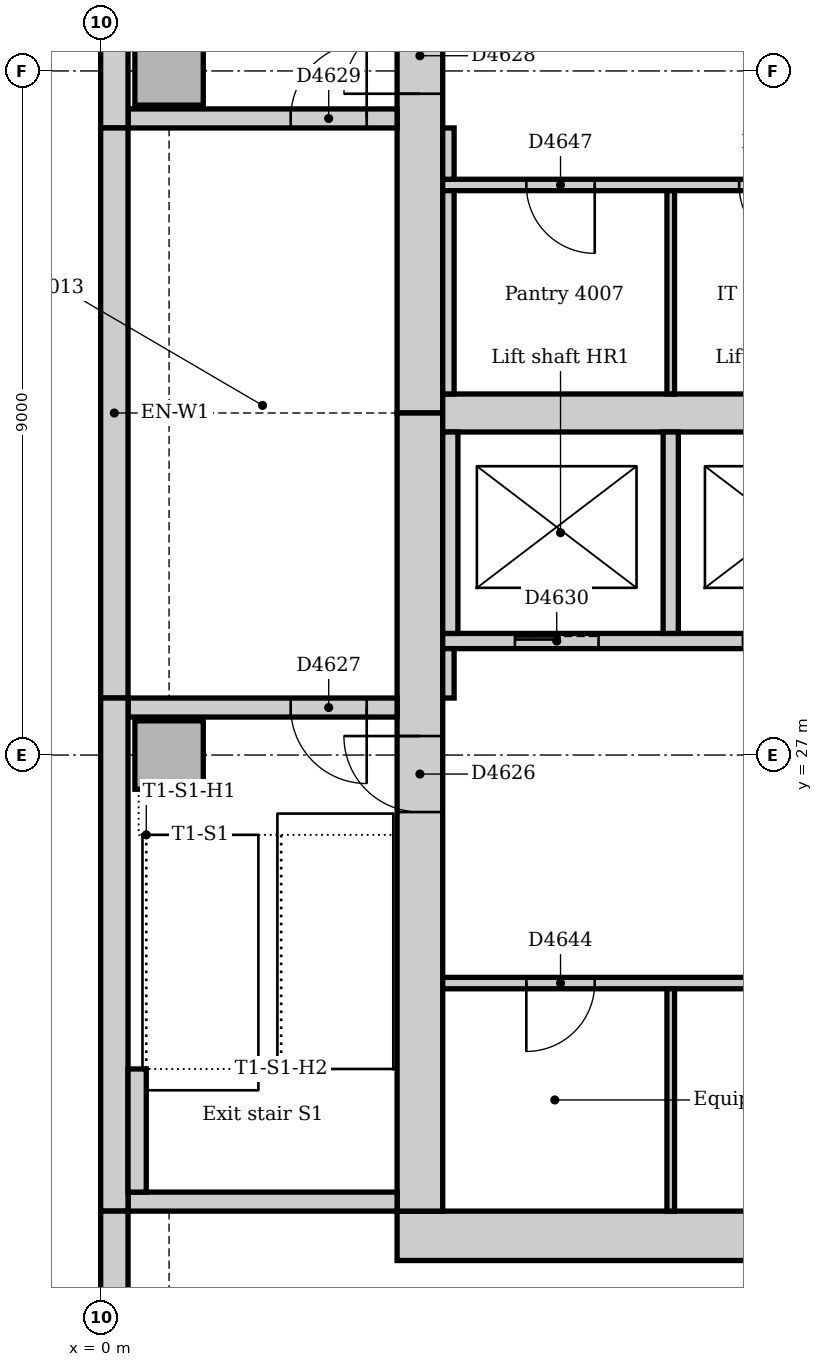
"""IFC4 building model, lengths in metres.
Left out: names, types, materials, properties, quantities, classifications, styles, units other than length and angle.
Written with IfcOpenShell. Run it as: python <this file> out.ifc"""

import sys

from ifc_helpers import new_model, si_unit, direction, frame, frame_2d, origin, origin_2d, place, context, subcontext, project, spatial, rectangle, extrude, element, fill, save


model = new_model("IFC4")
c1 = context("Model", 3, precision=1e-05, world=origin(), true_north=direction((0.0, 1.0)))
c2 = subcontext(c1, "Body", "Model", "MODEL_VIEW")
j1 = project(units=[si_unit("LENGTHUNIT", "METRE"), si_unit("PLANEANGLEUNIT", "RADIAN")], contexts=[c1])
p1 = place(None, origin())
s1 = spatial("IfcSite", under=j1, at=p1, CompositionType="ELEMENT")
p2 = place(p1, origin())
s2 = spatial("IfcBuilding", under=s1, at=p2, CompositionType="ELEMENT")
p3 = place(p2, frame((0.0, 0.0, 169.0)))
s3 = spatial("IfcBuildingStorey", under=s2, at=p3, CompositionType="ELEMENT", Elevation=169.0)
p4 = place(p3, frame((3.9, 20.675, 0.0), z_axis=(0.0, 0.0, 1.0), x_axis=(1.0, 0.0, 0.0)))
e1 = element("IfcWall", 1, at=p4, inside=s3, PredefinedType="SOLIDWALL", context=c2, shape_type="SweptSolid", body=[
    extrude(rectangle(XDim=19.25, YDim=0.65, at=frame_2d((9.625, 0.0))), origin(), (0.0, 0.0, 1.0), 4.0),
])
p5 = place(p3, frame((4.2, 42.0, 0.0), z_axis=(0.0, 0.0, 1.0), x_axis=(0.0, -1.0, 0.0)))
e2 = element("IfcWall", 2, at=p5, inside=s3, PredefinedType="SOLIDWALL", context=c2, shape_type="SweptSolid", body=[
    extrude(rectangle(XDim=10.5, YDim=0.6, at=frame_2d((5.25, 0.0))), origin(), (0.0, 0.0, 1.0), 4.0),
])
p6 = place(p5, frame((5.3, 0.0, 0.0)))
e3 = element("IfcOpeningElement", 3, at=p6, cuts=e2, PredefinedType="OPENING", context=c2, shape_type="SweptSolid", body=[
    extrude(rectangle(XDim=1.0, YDim=2.1, at=frame_2d((0.5, 1.05))), frame((0.0, 0.31, 0.0), z_axis=(0.0, -1.0, 0.0), x_axis=(1.0, 0.0, 0.0)), (0.0, 0.0, 1.0), 0.62),
])
p7 = place(p3, frame((4.2, 31.5, 0.0), z_axis=(0.0, 0.0, 1.0), x_axis=(0.0, -1.0, 0.0)))
e4 = element("IfcWall", 4, at=p7, inside=s3, PredefinedType="SOLIDWALL", context=c2, shape_type="SweptSolid", body=[
    extrude(rectangle(XDim=10.5, YDim=0.6, at=frame_2d((5.25, 0.0))), origin(), (0.0, 0.0, 1.0), 4.0),
])
p8 = place(p7, frame((4.25, 0.0, 0.0)))
e5 = element("IfcOpeningElement", 5, at=p8, cuts=e4, PredefinedType="OPENING", context=c2, shape_type="SweptSolid", body=[
    extrude(rectangle(XDim=1.0, YDim=2.1, at=frame_2d((0.5, 1.05))), frame((0.0, 0.31, 0.0), z_axis=(0.0, -1.0, 0.0), x_axis=(1.0, 0.0, 0.0)), (0.0, 0.0, 1.0), 0.62),
])
p9 = place(p3, frame((4.5, 31.5, 0.0), z_axis=(0.0, 0.0, 1.0), x_axis=(1.0, 0.0, 0.0)))
e6 = element("IfcWall", 6, at=p9, inside=s3, PredefinedType="SOLIDWALL", context=c2, shape_type="SweptSolid", body=[
    extrude(rectangle(XDim=18.0, YDim=0.5, at=frame_2d((9.0, 0.0))), origin(), (0.0, 0.0, 1.0), 4.0),
])
p10 = place(p3, frame((0.36, 21.125, 0.0), z_axis=(0.0, 0.0, 1.0), x_axis=(1.0, 0.0, 0.0)))
e7 = element("IfcWall", 7, at=p10, inside=s3, PredefinedType="SOLIDWALL", context=c2, shape_type="SweptSolid", body=[
    extrude(rectangle(XDim=3.54, YDim=0.25, at=frame_2d((1.77, 0.0))), origin(), (0.0, 0.0, 1.0), 4.0),
])
p11 = place(p3, frame((3.9, 27.625, 0.0), z_axis=(0.0, 0.0, 1.0), x_axis=(-1.0, 0.0, 0.0)))
e8 = element("IfcWall", 8, at=p11, inside=s3, PredefinedType="SOLIDWALL", context=c2, shape_type="SweptSolid", body=[
    extrude(rectangle(XDim=3.54, YDim=0.25, at=frame_2d((1.77, 0.0))), origin(), (0.0, 0.0, 1.0), 4.0),
])
p12 = place(p11, frame((0.4, 0.0, 0.0)))
e9 = element("IfcOpeningElement", 9, at=p12, cuts=e8, PredefinedType="OPENING", context=c2, shape_type="SweptSolid", body=[
    extrude(rectangle(XDim=1.0, YDim=2.1, at=frame_2d((0.5, 1.05))), frame((0.0, 0.135, 0.0), z_axis=(0.0, -1.0, 0.0), x_axis=(1.0, 0.0, 0.0)), (0.0, 0.0, 1.0), 0.27),
])
p13 = place(p3, frame((0.36, 35.375, 0.0), z_axis=(0.0, 0.0, 1.0), x_axis=(1.0, 0.0, 0.0)))
e10 = element("IfcWall", 10, at=p13, inside=s3, PredefinedType="SOLIDWALL", context=c2, shape_type="SweptSolid", body=[
    extrude(rectangle(XDim=3.54, YDim=0.25, at=frame_2d((1.77, 0.0))), origin(), (0.0, 0.0, 1.0), 4.0),
])
p14 = place(p13, frame((2.14, 0.0, 0.0)))
e11 = element("IfcOpeningElement", 11, at=p14, cuts=e10, PredefinedType="OPENING", context=c2, shape_type="SweptSolid", body=[
    extrude(rectangle(XDim=1.0, YDim=2.1, at=frame_2d((0.5, 1.05))), frame((0.0, 0.135, 0.0), z_axis=(0.0, -1.0, 0.0), x_axis=(1.0, 0.0, 0.0)), (0.0, 0.0, 1.0), 0.27),
])
for number, where, z_axis, x_axis in (
    (12, (0.9, 27.0, 0.0), (0.0, 0.0, 1.0), (1.0, 0.0, 0.0)),
    (13, (0.9, 36.0, 0.0), (0.0, 0.0, 1.0), (1.0, 0.0, 0.0)),
):
    element("IfcColumn", number, at=place(p3, frame(where, z_axis=z_axis, x_axis=x_axis)), inside=s3, PredefinedType="COLUMN", context=c2, shape_type="SweptSolid", body=[
        extrude(rectangle(XDim=0.9, YDim=0.9, at=origin_2d()), origin(), (0.0, 0.0, 1.0), 4.0),
    ])
p15 = place(p3, frame((0.18, 42.0, 0.0), z_axis=(0.0, 0.0, 1.0), x_axis=(0.0, -1.0, 0.0)))
e14 = element("IfcWall", 14, at=p15, inside=s3, PredefinedType="STANDARD", context=c2, shape_type="SweptSolid", body=[
    extrude(rectangle(XDim=6.75, YDim=0.36, at=frame_2d((3.375, 0.0))), origin(), (0.0, 0.0, 1.0), 3.85),
])
p16 = place(p3, frame((0.18, 35.25, 0.0), z_axis=(0.0, 0.0, 1.0), x_axis=(0.0, -1.0, 0.0)))
e15 = element("IfcWall", 15, at=p16, inside=s3, PredefinedType="STANDARD", context=c2, shape_type="SweptSolid", body=[
    extrude(rectangle(XDim=7.5, YDim=0.36, at=frame_2d((3.75, 0.0))), origin(), (0.0, 0.0, 1.0), 3.85),
])
p17 = place(p3, frame((0.18, 27.75, 0.0), z_axis=(0.0, 0.0, 1.0), x_axis=(0.0, -1.0, 0.0)))
e16 = element("IfcWall", 16, at=p17, inside=s3, PredefinedType="STANDARD", context=c2, shape_type="SweptSolid", body=[
    extrude(rectangle(XDim=6.75, YDim=0.36, at=frame_2d((3.375, 0.0))), origin(), (0.0, 0.0, 1.0), 3.85),
])
p18 = place(p3, frame((0.18, 21.0, 0.0), z_axis=(0.0, 0.0, 1.0), x_axis=(0.0, -1.0, 0.0)))
e17 = element("IfcWall", 17, at=p18, inside=s3, PredefinedType="STANDARD", context=c2, shape_type="SweptSolid", body=[
    extrude(rectangle(XDim=7.757, YDim=0.36, at=frame_2d((3.879, 0.0))), origin(), (0.0, 0.0, 1.0), 3.85),
])
p19 = place(p18, frame((1.35, 0.0, 0.9)))
e18 = element("IfcOpeningElement", 18, at=p19, cuts=e17, PredefinedType="OPENING", context=c2, shape_type="SweptSolid", body=[
    extrude(rectangle(XDim=3.3, YDim=1.6, at=frame_2d((1.65, 0.8))), frame((0.0, 0.19, 0.0), z_axis=(0.0, -1.0, 0.0), x_axis=(1.0, 0.0, 0.0)), (0.0, 0.0, 1.0), 0.38),
])
p20 = place(p3, frame((0.48, 21.25, 0.0), z_axis=(0.0, 0.0, 1.0), x_axis=(0.0, 1.0, 0.0)))
e19 = element("IfcWall", 19, at=p20, inside=s3, PredefinedType="STANDARD", context=c2, shape_type="SweptSolid", body=[
    extrude(rectangle(XDim=1.62, YDim=0.24, at=frame_2d((0.81, 0.0))), origin(), (0.0, 0.0, 1.0), 4.0),
])
p21 = place(p3, frame((4.5, 28.5, 0.0), z_axis=(0.0, 0.0, 1.0), x_axis=(1.0, 0.0, 0.0)))
e20 = element("IfcWall", 20, at=p21, inside=s3, PredefinedType="PARTITIONING", context=c2, shape_type="SweptSolid", body=[
    extrude(rectangle(XDim=18.0, YDim=0.2, at=frame_2d((9.0, 0.0))), origin(), (0.0, 0.0, 1.0), 3.85),
])
p22 = place(p21, frame((0.95, 0.0, 0.0)))
e21 = element("IfcOpeningElement", 21, at=p22, cuts=e20, PredefinedType="OPENING", context=c2, shape_type="SweptSolid", body=[
    extrude(rectangle(XDim=1.1, YDim=2.1, at=frame_2d((0.55, 1.05))), frame((0.0, 0.11, 0.0), z_axis=(0.0, -1.0, 0.0), x_axis=(1.0, 0.0, 0.0)), (0.0, 0.0, 1.0), 0.22),
])
p23 = place(p21, frame((3.95, 0.0, 0.0)))
e22 = element("IfcOpeningElement", 22, at=p23, cuts=e20, PredefinedType="OPENING", context=c2, shape_type="SweptSolid", body=[
    extrude(rectangle(XDim=1.1, YDim=2.1, at=frame_2d((0.55, 1.05))), frame((0.0, 0.11, 0.0), z_axis=(0.0, -1.0, 0.0), x_axis=(1.0, 0.0, 0.0)), (0.0, 0.0, 1.0), 0.22),
])
p24 = place(p21, frame((6.95, 0.0, 0.0)))
e23 = element("IfcOpeningElement", 23, at=p24, cuts=e20, PredefinedType="OPENING", context=c2, shape_type="SweptSolid", body=[
    extrude(rectangle(XDim=1.1, YDim=2.1, at=frame_2d((0.55, 1.05))), frame((0.0, 0.11, 0.0), z_axis=(0.0, -1.0, 0.0), x_axis=(1.0, 0.0, 0.0)), (0.0, 0.0, 1.0), 0.22),
])
p25 = place(p21, frame((9.95, 0.0, 0.0)))
e24 = element("IfcOpeningElement", 24, at=p25, cuts=e20, PredefinedType="OPENING", context=c2, shape_type="SweptSolid", body=[
    extrude(rectangle(XDim=1.1, YDim=2.1, at=frame_2d((0.55, 1.05))), frame((0.0, 0.11, 0.0), z_axis=(0.0, -1.0, 0.0), x_axis=(1.0, 0.0, 0.0)), (0.0, 0.0, 1.0), 0.22),
])
p26 = place(p21, frame((12.95, 0.0, 0.0)))
e25 = element("IfcOpeningElement", 25, at=p26, cuts=e20, PredefinedType="OPENING", context=c2, shape_type="SweptSolid", body=[
    extrude(rectangle(XDim=1.1, YDim=2.1, at=frame_2d((0.55, 1.05))), frame((0.0, 0.11, 0.0), z_axis=(0.0, -1.0, 0.0), x_axis=(1.0, 0.0, 0.0)), (0.0, 0.0, 1.0), 0.22),
])
p27 = place(p21, frame((15.95, 0.0, 0.0)))
e26 = element("IfcOpeningElement", 26, at=p27, cuts=e20, PredefinedType="OPENING", context=c2, shape_type="SweptSolid", body=[
    extrude(rectangle(XDim=1.1, YDim=2.1, at=frame_2d((0.55, 1.05))), frame((0.0, 0.11, 0.0), z_axis=(0.0, -1.0, 0.0), x_axis=(1.0, 0.0, 0.0)), (0.0, 0.0, 1.0), 0.22),
])
for number, where, z_axis, x_axis in (
    (27, (4.6, 28.6, 0.0), (0.0, 0.0, 1.0), (0.0, 1.0, 0.0)),
    (28, (7.5, 28.6, 0.0), (0.0, 0.0, 1.0), (0.0, 1.0, 0.0)),
):
    element("IfcWall", number, at=place(p3, frame(where, z_axis=z_axis, x_axis=x_axis)), inside=s3, PredefinedType="PARTITIONING", context=c2, shape_type="SweptSolid", body=[
        extrude(rectangle(XDim=2.65, YDim=0.2, at=frame_2d((1.325, 0.0))), origin(), (0.0, 0.0, 1.0), 3.85),
    ])
p28 = place(p3, frame((4.5, 24.0, 0.0), z_axis=(0.0, 0.0, 1.0), x_axis=(1.0, 0.0, 0.0)))
e29 = element("IfcWall", 29, at=p28, inside=s3, PredefinedType="PARTITIONING", context=c2, shape_type="SweptSolid", body=[
    extrude(rectangle(XDim=18.0, YDim=0.15, at=frame_2d((9.0, 0.0))), origin(), (0.0, 0.0, 1.0), 3.85),
])
p29 = place(p28, frame((1.1, 0.0, 0.0)))
e30 = element("IfcOpeningElement", 30, at=p29, cuts=e29, PredefinedType="OPENING", context=c2, shape_type="SweptSolid", body=[
    extrude(rectangle(XDim=0.9, YDim=2.1, at=frame_2d((0.45, 1.05))), frame((0.0, 0.085, 0.0), z_axis=(0.0, -1.0, 0.0), x_axis=(1.0, 0.0, 0.0)), (0.0, 0.0, 1.0), 0.17),
])
p30 = place(p28, frame((7.05, 0.0, 0.0)))
e31 = element("IfcOpeningElement", 31, at=p30, cuts=e29, PredefinedType="OPENING", context=c2, shape_type="SweptSolid", body=[
    extrude(rectangle(XDim=0.9, YDim=2.1, at=frame_2d((0.45, 1.05))), frame((0.0, 0.085, 0.0), z_axis=(0.0, -1.0, 0.0), x_axis=(1.0, 0.0, 0.0)), (0.0, 0.0, 1.0), 0.17),
])
p31 = place(p28, frame((14.45, 0.0, 0.0)))
e32 = element("IfcOpeningElement", 32, at=p31, cuts=e29, PredefinedType="OPENING", context=c2, shape_type="SweptSolid", body=[
    extrude(rectangle(XDim=0.9, YDim=2.1, at=frame_2d((0.45, 1.05))), frame((0.0, 0.085, 0.0), z_axis=(0.0, -1.0, 0.0), x_axis=(1.0, 0.0, 0.0)), (0.0, 0.0, 1.0), 0.17),
])
p32 = place(p3, frame((4.5, 34.5, 0.0), z_axis=(0.0, 0.0, 1.0), x_axis=(1.0, 0.0, 0.0)))
e33 = element("IfcWall", 33, at=p32, inside=s3, PredefinedType="PARTITIONING", context=c2, shape_type="SweptSolid", body=[
    extrude(rectangle(XDim=5.9, YDim=0.15, at=frame_2d((2.95, 0.0))), origin(), (0.0, 0.0, 1.0), 3.85),
])
p33 = place(p32, frame((1.1, 0.0, 0.0)))
e34 = element("IfcOpeningElement", 34, at=p33, cuts=e33, PredefinedType="OPENING", context=c2, shape_type="SweptSolid", body=[
    extrude(rectangle(XDim=0.9, YDim=2.1, at=frame_2d((0.45, 1.05))), frame((0.0, 0.085, 0.0), z_axis=(0.0, -1.0, 0.0), x_axis=(1.0, 0.0, 0.0)), (0.0, 0.0, 1.0), 0.17),
])
p34 = place(p32, frame((3.9, 0.0, 0.0)))
e35 = element("IfcOpeningElement", 35, at=p34, cuts=e33, PredefinedType="OPENING", context=c2, shape_type="SweptSolid", body=[
    extrude(rectangle(XDim=0.9, YDim=2.1, at=frame_2d((0.45, 1.05))), frame((0.0, 0.085, 0.0), z_axis=(0.0, -1.0, 0.0), x_axis=(1.0, 0.0, 0.0)), (0.0, 0.0, 1.0), 0.17),
])
p35 = place(p3, frame((4.575, 34.575, 0.0), z_axis=(0.0, 0.0, 1.0), x_axis=(0.0, 1.0, 0.0)))
e36 = element("IfcWall", 36, at=p35, inside=s3, PredefinedType="PARTITIONING", context=c2, shape_type="SweptSolid", body=[
    extrude(rectangle(XDim=0.675, YDim=0.15, at=frame_2d((0.338, 0.0))), origin(), (0.0, 0.0, 1.0), 3.85),
])
p36 = place(p3, frame((4.575, 31.75, 0.0), z_axis=(0.0, 0.0, 1.0), x_axis=(0.0, 1.0, 0.0)))
e37 = element("IfcWall", 37, at=p36, inside=s3, PredefinedType="PARTITIONING", context=c2, shape_type="SweptSolid", body=[
    extrude(rectangle(XDim=2.675, YDim=0.15, at=frame_2d((1.337, 0.0))), origin(), (0.0, 0.0, 1.0), 3.85),
])
p37 = place(p3, frame((4.575, 27.75, 0.0), z_axis=(0.0, 0.0, 1.0), x_axis=(0.0, 1.0, 0.0)))
e38 = element("IfcWall", 38, at=p37, inside=s3, PredefinedType="PARTITIONING", context=c2, shape_type="SweptSolid", body=[
    extrude(rectangle(XDim=0.65, YDim=0.15, at=frame_2d((0.325, 0.0))), origin(), (0.0, 0.0, 1.0), 3.85),
])
p38 = place(p3, frame((7.5, 21.0, 0.0), z_axis=(0.0, 0.0, 1.0), x_axis=(0.0, 1.0, 0.0)))
e39 = element("IfcWall", 39, at=p38, inside=s3, PredefinedType="PARTITIONING", context=c2, shape_type="SweptSolid", body=[
    extrude(rectangle(XDim=2.925, YDim=0.1, at=frame_2d((1.462, 0.0))), origin(), (0.0, 0.0, 1.0), 3.85),
])
p39 = place(p3, frame((7.5, 31.75, 0.0), z_axis=(0.0, 0.0, 1.0), x_axis=(0.0, 1.0, 0.0)))
e40 = element("IfcWall", 40, at=p39, inside=s3, PredefinedType="PARTITIONING", context=c2, shape_type="SweptSolid", body=[
    extrude(rectangle(XDim=2.675, YDim=0.1, at=frame_2d((1.337, 0.0))), origin(), (0.0, 0.0, 1.0), 3.85),
])
p40 = place(p8, frame((1.0, 0.0, 0.0), z_axis=(0.0, 0.0, 1.0), x_axis=(-1.0, 0.0, 0.0)))
e41 = element("IfcDoor", 41, at=p40, inside=s3, OperationType="SINGLE_SWING_RIGHT", PredefinedType="DOOR", context=c2, shape_type="SweptSolid", body=[
    extrude(rectangle(XDim=1.0, YDim=2.1, at=frame_2d((0.5, 1.05))), frame((0.0, 0.025, 0.0), z_axis=(0.0, -1.0, 0.0), x_axis=(1.0, 0.0, 0.0)), (0.0, 0.0, 1.0), 0.05),
])
fill(e5, e41)
p41 = place(p12, origin())
e42 = element("IfcDoor", 42, at=p41, inside=s3, OperationType="SINGLE_SWING_LEFT", PredefinedType="DOOR", context=c2, shape_type="SweptSolid", body=[
    extrude(rectangle(XDim=1.0, YDim=2.1, at=frame_2d((0.5, 1.05))), frame((0.0, 0.025, 0.0), z_axis=(0.0, -1.0, 0.0), x_axis=(1.0, 0.0, 0.0)), (0.0, 0.0, 1.0), 0.05),
])
fill(e9, e42)
p42 = place(p6, frame((1.0, 0.0, 0.0), z_axis=(0.0, 0.0, 1.0), x_axis=(-1.0, 0.0, 0.0)))
e43 = element("IfcDoor", 43, at=p42, inside=s3, OperationType="SINGLE_SWING_LEFT", PredefinedType="DOOR", context=c2, shape_type="SweptSolid", body=[
    extrude(rectangle(XDim=1.0, YDim=2.1, at=frame_2d((0.5, 1.05))), frame((0.0, 0.025, 0.0), z_axis=(0.0, -1.0, 0.0), x_axis=(1.0, 0.0, 0.0)), (0.0, 0.0, 1.0), 0.05),
])
fill(e3, e43)
p43 = place(p14, origin())
e44 = element("IfcDoor", 44, at=p43, inside=s3, OperationType="SINGLE_SWING_RIGHT", PredefinedType="DOOR", context=c2, shape_type="SweptSolid", body=[
    extrude(rectangle(XDim=1.0, YDim=2.1, at=frame_2d((0.5, 1.05))), frame((0.0, 0.025, 0.0), z_axis=(0.0, -1.0, 0.0), x_axis=(1.0, 0.0, 0.0)), (0.0, 0.0, 1.0), 0.05),
])
fill(e11, e44)
p44 = place(p22, origin())
e45 = element("IfcDoor", 45, at=p44, inside=s3, OperationType="SLIDING_TO_LEFT", PredefinedType="DOOR", context=c2, shape_type="SweptSolid", body=[
    extrude(rectangle(XDim=1.1, YDim=2.1, at=frame_2d((0.55, 1.05))), frame((0.0, 0.025, 0.0), z_axis=(0.0, -1.0, 0.0), x_axis=(1.0, 0.0, 0.0)), (0.0, 0.0, 1.0), 0.05),
])
fill(e21, e45)
p45 = place(p29, frame((0.9, 0.0, 0.0), z_axis=(0.0, 0.0, 1.0), x_axis=(-1.0, 0.0, 0.0)))
e46 = element("IfcDoor", 46, at=p45, inside=s3, OperationType="SINGLE_SWING_RIGHT", PredefinedType="DOOR", context=c2, shape_type="SweptSolid", body=[
    extrude(rectangle(XDim=0.9, YDim=2.1, at=frame_2d((0.45, 1.05))), frame((0.0, 0.025, 0.0), z_axis=(0.0, -1.0, 0.0), x_axis=(1.0, 0.0, 0.0)), (0.0, 0.0, 1.0), 0.05),
])
fill(e30, e46)
p46 = place(p33, frame((0.9, 0.0, 0.0), z_axis=(0.0, 0.0, 1.0), x_axis=(-1.0, 0.0, 0.0)))
e47 = element("IfcDoor", 47, at=p46, inside=s3, OperationType="SINGLE_SWING_LEFT", PredefinedType="DOOR", context=c2, shape_type="SweptSolid", body=[
    extrude(rectangle(XDim=0.9, YDim=2.1, at=frame_2d((0.45, 1.05))), frame((0.0, 0.025, 0.0), z_axis=(0.0, -1.0, 0.0), x_axis=(1.0, 0.0, 0.0)), (0.0, 0.0, 1.0), 0.05),
])
fill(e34, e47)
p47 = place(p34, frame((0.9, 0.0, 0.0), z_axis=(0.0, 0.0, 1.0), x_axis=(-1.0, 0.0, 0.0)))
e48 = element("IfcDoor", 48, at=p47, inside=s3, OperationType="SINGLE_SWING_LEFT", PredefinedType="DOOR", context=c2, shape_type="SweptSolid", body=[
    extrude(rectangle(XDim=0.9, YDim=2.1, at=frame_2d((0.45, 1.05))), frame((0.0, 0.025, 0.0), z_axis=(0.0, -1.0, 0.0), x_axis=(1.0, 0.0, 0.0)), (0.0, 0.0, 1.0), 0.05),
])
fill(e35, e48)
save(model, sys.argv[1])
